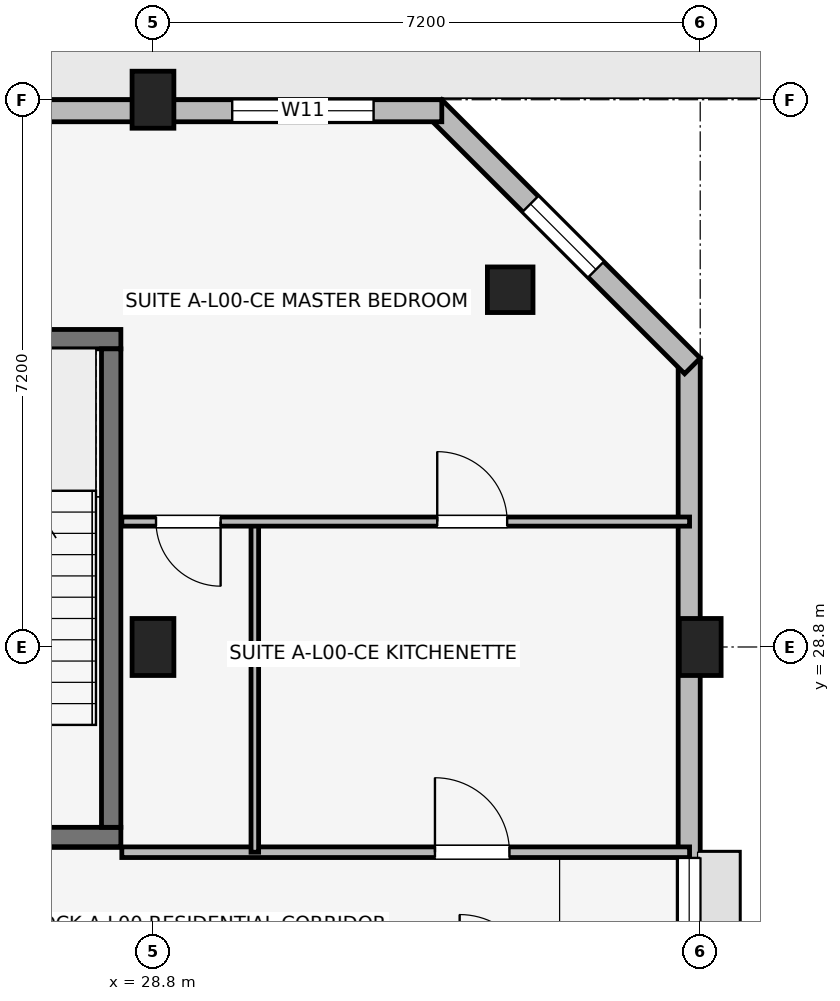
"""IFC4 building model, lengths in metres.
Left out: names, types, materials, properties, quantities, classifications, styles, units other than length and angle.
Written with IfcOpenShell. Run it as: python <this file> out.ifc"""

import sys

from ifc_helpers import new_model, si_unit, direction, frame, frame_2d, origin, origin_2d, place, context, subcontext, project, spatial, rectangle, extrude, element, fill, save


model = new_model("IFC4")
c1 = context("Model", 3, precision=1e-05, world=origin(), true_north=direction((0.0, 1.0)))
c2 = subcontext(c1, "Body", "Model", "MODEL_VIEW")
j1 = project(units=[si_unit("LENGTHUNIT", "METRE"), si_unit("PLANEANGLEUNIT", "RADIAN")], contexts=[c1])
p1 = place(None, origin())
s1 = spatial("IfcSite", under=j1, at=p1, CompositionType="ELEMENT")
p2 = place(p1, origin())
s2 = spatial("IfcBuilding", under=s1, at=p2, CompositionType="ELEMENT")
p3 = place(p2, origin())
s3 = spatial("IfcBuildingStorey", under=s2, at=p3, CompositionType="ELEMENT", Elevation=0.0)
for number, where, z_axis, x_axis in (
    (1, (28.8, 28.8, 0.0), (0.0, 0.0, 1.0), (1.0, 0.0, 0.0)),
    (2, (28.8, 36.0, 0.0), (0.0, 0.0, 1.0), (1.0, 0.0, 0.0)),
    (3, (36.0, 28.8, 0.0), (0.0, 0.0, 1.0), (1.0, 0.0, 0.0)),
):
    element("IfcColumn", number, at=place(p3, frame(where, z_axis=z_axis, x_axis=x_axis)), inside=s3, PredefinedType="COLUMN", context=c2, shape_type="SweptSolid", body=[
        extrude(rectangle(XDim=0.55, YDim=0.75, at=origin_2d()), origin(), (0.0, 0.0, 1.0), 4.5),
    ])
p4 = place(p3, frame((33.5, 33.5, 0.0), z_axis=(0.0, 0.0, 1.0), x_axis=(1.0, 0.0, 0.0)))
e4 = element("IfcColumn", 4, at=p4, inside=s3, PredefinedType="COLUMN", context=c2, shape_type="SweptSolid", body=[
    extrude(rectangle(XDim=0.6, YDim=0.6, at=origin_2d()), origin(), (0.0, 0.0, 1.0), 4.5),
])
p5 = place(p3, frame((25.073, 26.3, 0.0), z_axis=(0.0, 0.0, 1.0), x_axis=(1.0, 0.0, 0.0)))
e5 = element("IfcWall", 5, at=p5, inside=s3, PredefinedType="SHEAR", context=c2, shape_type="SweptSolid", body=[
    extrude(rectangle(XDim=3.305, YDim=0.255, at=frame_2d((1.652, 0.0))), origin(), (0.0, 0.0, 1.0), 4.5),
])
p6 = place(p5, frame((1.127, 0.0, 0.0)))
e6 = element("IfcOpeningElement", 6, at=p6, cuts=e5, PredefinedType="OPENING", context=c2, shape_type="SweptSolid", body=[
    extrude(rectangle(XDim=1.05, YDim=2.12, at=frame_2d((0.525, 1.06))), frame((0.0, 0.137, 0.0), z_axis=(0.0, -1.0, 0.0), x_axis=(1.0, 0.0, 0.0)), (0.0, 0.0, 1.0), 0.275),
])
p7 = place(p3, frame((25.073, 32.85, 0.0), z_axis=(0.0, 0.0, 1.0), x_axis=(1.0, 0.0, 0.0)))
e7 = element("IfcWall", 7, at=p7, inside=s3, PredefinedType="SHEAR", context=c2, shape_type="SweptSolid", body=[
    extrude(rectangle(XDim=3.305, YDim=0.255, at=frame_2d((1.652, 0.0))), origin(), (0.0, 0.0, 1.0), 4.5),
])
p8 = place(p3, frame((28.25, 26.427, 0.0), z_axis=(0.0, 0.0, 1.0), x_axis=(0.0, 1.0, 0.0)))
e8 = element("IfcWall", 8, at=p8, inside=s3, PredefinedType="SHEAR", context=c2, shape_type="SweptSolid", body=[
    extrude(rectangle(XDim=6.295, YDim=0.255, at=frame_2d((3.147, 0.0))), origin(), (0.0, 0.0, 1.0), 4.5),
])
p9 = place(p3, frame((35.855, 17.8, 0.0), z_axis=(0.0, 0.0, 1.0), x_axis=(0.0, 1.0, 0.0)))
e9 = element("IfcWall", 9, at=p9, inside=s3, PredefinedType="SOLIDWALL", context=c2, shape_type="SweptSolid", body=[
    extrude(rectangle(XDim=14.8, YDim=0.29, at=frame_2d((7.4, 0.0))), origin(), (0.0, 0.0, 1.0), 3.53),
])
p10 = place(p9, frame((6.575, 0.0, 1.05)))
e10 = element("IfcOpeningElement", 10, at=p10, cuts=e9, PredefinedType="OPENING", context=c2, shape_type="SweptSolid", body=[
    extrude(rectangle(XDim=1.65, YDim=1.15, at=frame_2d((0.825, 0.575))), frame((0.0, 0.155, 0.0), z_axis=(0.0, -1.0, 0.0), x_axis=(1.0, 0.0, 0.0)), (0.0, 0.0, 1.0), 0.31),
])
p11 = place(p9, frame((1.115, 0.0, 0.75)))
e11 = element("IfcOpeningElement", 11, at=p11, cuts=e9, PredefinedType="OPENING", context=c2, shape_type="SweptSolid", body=[
    extrude(rectangle(XDim=1.3, YDim=1.55, at=frame_2d((0.65, 0.775))), frame((0.0, 0.155, 0.0), z_axis=(0.0, -1.0, 0.0), x_axis=(1.0, 0.0, 0.0)), (0.0, 0.0, 1.0), 0.31),
])
p12 = place(p3, frame((35.897, 32.498, 0.0), z_axis=(0.0, 0.0, 1.0), x_axis=(-0.707106781187, 0.707106781187, 0.0)))
e12 = element("IfcWall", 12, at=p12, inside=s3, PredefinedType="SOLIDWALL", context=c2, shape_type="SweptSolid", body=[
    extrude(rectangle(XDim=4.808, YDim=0.29, at=frame_2d((2.404, 0.0))), origin(), (0.0, 0.0, 1.0), 4.175),
])
p13 = place(p12, frame((1.794, 0.0, 0.85)))
e13 = element("IfcOpeningElement", 13, at=p13, cuts=e12, PredefinedType="OPENING", context=c2, shape_type="SweptSolid", body=[
    extrude(rectangle(XDim=1.22, YDim=1.5, at=frame_2d((0.61, 0.75))), frame((0.0, 0.155, 0.0), z_axis=(0.0, -1.0, 0.0), x_axis=(1.0, 0.0, 0.0)), (0.0, 0.0, 1.0), 0.31),
])
p14 = place(p3, frame((32.6, 35.855, 0.0), z_axis=(0.0, 0.0, 1.0), x_axis=(-1.0, 0.0, 0.0)))
e14 = element("IfcWall", 14, at=p14, inside=s3, PredefinedType="SOLIDWALL", context=c2, shape_type="SweptSolid", body=[
    extrude(rectangle(XDim=29.2, YDim=0.29, at=frame_2d((14.6, 0.0))), origin(), (0.0, 0.0, 1.0), 3.53),
])
p15 = place(p14, frame((20.4, 0.0, 0.0), z_axis=(0.0, 0.0, 1.0), x_axis=(-1.0, 0.0, 0.0)))
e15 = element("IfcOpeningElement", 15, at=p15, cuts=e14, PredefinedType="OPENING", context=c2, shape_type="SweptSolid", body=[
    extrude(rectangle(XDim=1.1, YDim=2.15, at=frame_2d((0.55, 1.075))), frame((0.0, 0.155, 0.0), z_axis=(0.0, -1.0, 0.0), x_axis=(1.0, 0.0, 0.0)), (0.0, 0.0, 1.0), 0.31),
])
p16 = place(p14, frame((9.8, 0.0, 0.0), z_axis=(0.0, 0.0, 1.0), x_axis=(-1.0, 0.0, 0.0)))
e16 = element("IfcOpeningElement", 16, at=p16, cuts=e14, PredefinedType="OPENING", context=c2, shape_type="SweptSolid", body=[
    extrude(rectangle(XDim=1.1, YDim=2.15, at=frame_2d((0.55, 1.075))), frame((0.0, 0.155, 0.0), z_axis=(0.0, -1.0, 0.0), x_axis=(1.0, 0.0, 0.0)), (0.0, 0.0, 1.0), 0.31),
])
p17 = place(p14, frame((0.897, 0.0, 0.7)))
e17 = element("IfcOpeningElement", 17, at=p17, cuts=e14, PredefinedType="OPENING", context=c2, shape_type="SweptSolid", body=[
    extrude(rectangle(XDim=1.86, YDim=1.6, at=frame_2d((0.93, 0.8))), frame((0.0, 0.155, 0.0), z_axis=(0.0, -1.0, 0.0), x_axis=(1.0, 0.0, 0.0)), (0.0, 0.0, 1.0), 0.31),
])
p18 = place(p14, frame((26.373, 0.0, 0.7)))
e18 = element("IfcOpeningElement", 18, at=p18, cuts=e14, PredefinedType="OPENING", context=c2, shape_type="SweptSolid", body=[
    extrude(rectangle(XDim=2.0, YDim=1.65, at=frame_2d((1.0, 0.825))), frame((0.0, 0.155, 0.0), z_axis=(0.0, -1.0, 0.0), x_axis=(1.0, 0.0, 0.0)), (0.0, 0.0, 1.0), 0.31),
])
p19 = place(p3, frame((28.39, 26.1, 0.0), z_axis=(0.0, 0.0, 1.0), x_axis=(1.0, 0.0, 0.0)))
e19 = element("IfcWall", 19, at=p19, inside=s3, PredefinedType="PARTITIONING", context=c2, shape_type="SweptSolid", body=[
    extrude(rectangle(XDim=7.47, YDim=0.14, at=frame_2d((3.735, 0.0))), origin(), (0.0, 0.0, 1.0), 3.15),
])
p20 = place(p19, frame((4.12, 0.0, 0.0)))
e20 = element("IfcOpeningElement", 20, at=p20, cuts=e19, PredefinedType="OPENING", context=c2, shape_type="SweptSolid", body=[
    extrude(rectangle(XDim=0.98, YDim=2.1, at=frame_2d((0.49, 1.05))), frame((0.0, 0.08, 0.0), z_axis=(0.0, -1.0, 0.0), x_axis=(1.0, 0.0, 0.0)), (0.0, 0.0, 1.0), 0.16),
])
p21 = place(p3, frame((30.14, 26.1, 0.0), z_axis=(0.0, 0.0, 1.0), x_axis=(0.0, 1.0, 0.0)))
e21 = element("IfcWall", 21, at=p21, inside=s3, PredefinedType="PARTITIONING", context=c2, shape_type="SweptSolid", body=[
    extrude(rectangle(XDim=4.35, YDim=0.1, at=frame_2d((2.175, 0.0))), origin(), (0.0, 0.0, 1.0), 3.15),
])
p22 = place(p3, frame((28.39, 30.45, 0.0), z_axis=(0.0, 0.0, 1.0), x_axis=(1.0, 0.0, 0.0)))
e22 = element("IfcWall", 22, at=p22, inside=s3, PredefinedType="PARTITIONING", context=c2, shape_type="SweptSolid", body=[
    extrude(rectangle(XDim=7.47, YDim=0.12, at=frame_2d((3.735, 0.0))), origin(), (0.0, 0.0, 1.0), 3.15),
])
p23 = place(p22, frame((1.3, 0.0, 0.0), z_axis=(0.0, 0.0, 1.0), x_axis=(-1.0, 0.0, 0.0)))
e23 = element("IfcOpeningElement", 23, at=p23, cuts=e22, PredefinedType="OPENING", context=c2, shape_type="SweptSolid", body=[
    extrude(rectangle(XDim=0.85, YDim=2.08, at=frame_2d((0.425, 1.04))), frame((0.0, 0.07, 0.0), z_axis=(0.0, -1.0, 0.0), x_axis=(1.0, 0.0, 0.0)), (0.0, 0.0, 1.0), 0.14),
])
p24 = place(p22, frame((4.15, 0.0, 0.0)))
e24 = element("IfcOpeningElement", 24, at=p24, cuts=e22, PredefinedType="OPENING", context=c2, shape_type="SweptSolid", body=[
    extrude(rectangle(XDim=0.92, YDim=2.08, at=frame_2d((0.46, 1.04))), frame((0.0, 0.07, 0.0), z_axis=(0.0, -1.0, 0.0), x_axis=(1.0, 0.0, 0.0)), (0.0, 0.0, 1.0), 0.14),
])
p25 = place(p13, origin())
e25 = element("IfcWindow", 25, at=p25, inside=s3, PartitioningType="SINGLE_PANEL", PredefinedType="WINDOW", context=c2, shape_type="SweptSolid", body=[
    extrude(rectangle(XDim=1.22, YDim=1.5, at=frame_2d((0.61, 0.75))), frame((0.0, 0.03, 0.0), z_axis=(0.0, -1.0, 0.0), x_axis=(1.0, 0.0, 0.0)), (0.0, 0.0, 1.0), 0.06),
])
fill(e13, e25)
p26 = place(p17, origin())
e26 = element("IfcWindow", 26, at=p26, inside=s3, PartitioningType="SINGLE_PANEL", PredefinedType="WINDOW", context=c2, shape_type="SweptSolid", body=[
    extrude(rectangle(XDim=1.86, YDim=1.6, at=frame_2d((0.93, 0.8))), frame((0.0, 0.03, 0.0), z_axis=(0.0, -1.0, 0.0), x_axis=(1.0, 0.0, 0.0)), (0.0, 0.0, 1.0), 0.06),
])
fill(e17, e26)
p27 = place(p10, origin())
e27 = element("IfcWindow", 27, at=p27, inside=s3, PartitioningType="SINGLE_PANEL", PredefinedType="WINDOW", context=c2, shape_type="SweptSolid", body=[
    extrude(rectangle(XDim=1.65, YDim=1.15, at=frame_2d((0.825, 0.575))), frame((0.0, 0.03, 0.0), z_axis=(0.0, -1.0, 0.0), x_axis=(1.0, 0.0, 0.0)), (0.0, 0.0, 1.0), 0.06),
])
fill(e10, e27)
p28 = place(p20, origin())
e28 = element("IfcDoor", 28, at=p28, inside=s3, OperationType="SINGLE_SWING_LEFT", PredefinedType="DOOR", context=c2, shape_type="SweptSolid", body=[
    extrude(rectangle(XDim=0.98, YDim=2.1, at=frame_2d((0.49, 1.05))), frame((0.0, 0.025, 0.0), z_axis=(0.0, -1.0, 0.0), x_axis=(1.0, 0.0, 0.0)), (0.0, 0.0, 1.0), 0.05),
])
fill(e20, e28)
p29 = place(p23, origin())
e29 = element("IfcDoor", 29, at=p29, inside=s3, OperationType="SINGLE_SWING_RIGHT", PredefinedType="DOOR", context=c2, shape_type="SweptSolid", body=[
    extrude(rectangle(XDim=0.85, YDim=2.08, at=frame_2d((0.425, 1.04))), frame((0.0, 0.025, 0.0), z_axis=(0.0, -1.0, 0.0), x_axis=(1.0, 0.0, 0.0)), (0.0, 0.0, 1.0), 0.05),
])
fill(e23, e29)
p30 = place(p24, origin())
e30 = element("IfcDoor", 30, at=p30, inside=s3, OperationType="SINGLE_SWING_LEFT", PredefinedType="DOOR", context=c2, shape_type="SweptSolid", body=[
    extrude(rectangle(XDim=0.92, YDim=2.08, at=frame_2d((0.46, 1.04))), frame((0.0, 0.025, 0.0), z_axis=(0.0, -1.0, 0.0), x_axis=(1.0, 0.0, 0.0)), (0.0, 0.0, 1.0), 0.05),
])
fill(e24, e30)
save(model, sys.argv[1])
